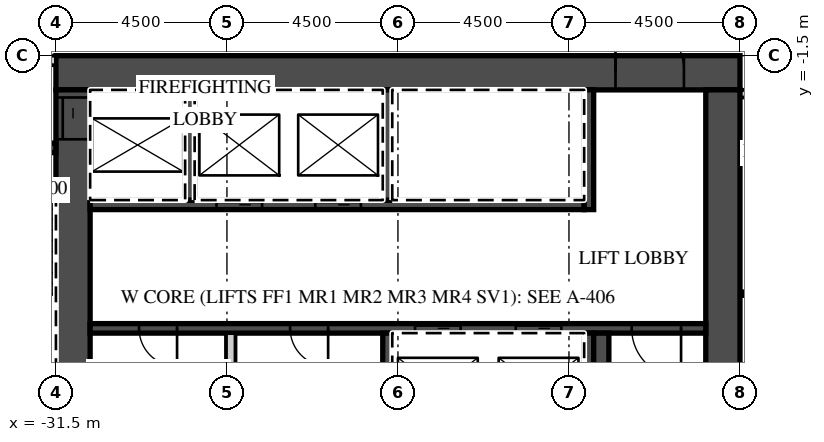
"""IFC4 building model, lengths in metres.
Left out: names, types, materials, properties, quantities, classifications, styles, units other than length and angle.
Written with IfcOpenShell. Run it as: python <this file> out.ifc"""

import sys

from ifc_helpers import new_model, si_unit, direction, frame, frame_2d, origin, place, context, subcontext, project, spatial, rectangle, extrude, element, fill, save


model = new_model("IFC4")
c1 = context("Model", 3, precision=1e-05, world=origin(), true_north=direction((0.0, 1.0)))
c2 = subcontext(c1, "Body", "Model", "MODEL_VIEW")
j1 = project(units=[si_unit("LENGTHUNIT", "METRE"), si_unit("PLANEANGLEUNIT", "RADIAN")], contexts=[c1])
p1 = place(None, origin())
s1 = spatial("IfcSite", under=j1, at=p1, CompositionType="ELEMENT")
p2 = place(p1, origin())
s2 = spatial("IfcBuilding", under=s1, at=p2, CompositionType="ELEMENT")
p3 = place(p2, frame((0.0, 0.0, 176.8)))
s3 = spatial("IfcBuildingStorey", under=s2, at=p3, CompositionType="ELEMENT", Elevation=176.8)
p4 = place(p3, frame((-13.5, -2.5, 0.0), z_axis=(0.0, 0.0, 1.0), x_axis=(1.0, 0.0, 0.0)))
e1 = element("IfcWall", 1, at=p4, inside=s3, PredefinedType="PARTITIONING", context=c2, shape_type="SweptSolid", body=[
    extrude(rectangle(XDim=27.0, YDim=0.2, at=frame_2d((13.5, 0.0))), origin(), (0.0, 0.0, 1.0), 3.02),
])
p5 = place(p4, frame((2.925, 0.0, 0.0)))
e2 = element("IfcOpeningElement", 2, at=p5, cuts=e1, PredefinedType="OPENING", context=c2, shape_type="SweptSolid", body=[
    extrude(rectangle(XDim=1.0, YDim=2.1, at=frame_2d((0.5, 1.05))), frame((0.0, 0.11, 0.0), z_axis=(0.0, -1.0, 0.0), x_axis=(1.0, 0.0, 0.0)), (0.0, 0.0, 1.0), 0.22),
])
p6 = place(p4, frame((7.45, 0.0, 0.0)))
e3 = element("IfcOpeningElement", 3, at=p6, cuts=e1, PredefinedType="OPENING", context=c2, shape_type="SweptSolid", body=[
    extrude(rectangle(XDim=1.0, YDim=2.1, at=frame_2d((0.5, 1.05))), frame((0.0, 0.11, 0.0), z_axis=(0.0, -1.0, 0.0), x_axis=(1.0, 0.0, 0.0)), (0.0, 0.0, 1.0), 0.22),
])
p7 = place(p4, frame((11.925, 0.0, 0.0)))
e4 = element("IfcOpeningElement", 4, at=p7, cuts=e1, PredefinedType="OPENING", context=c2, shape_type="SweptSolid", body=[
    extrude(rectangle(XDim=1.0, YDim=2.1, at=frame_2d((0.5, 1.05))), frame((0.0, 0.11, 0.0), z_axis=(0.0, -1.0, 0.0), x_axis=(1.0, 0.0, 0.0)), (0.0, 0.0, 1.0), 0.22),
])
p8 = place(p4, frame((18.862, 0.0, 0.0)))
e5 = element("IfcOpeningElement", 5, at=p8, cuts=e1, PredefinedType="OPENING", context=c2, shape_type="SweptSolid", body=[
    extrude(rectangle(XDim=1.2, YDim=2.1, at=frame_2d((0.6, 1.05))), frame((0.0, 0.11, 0.0), z_axis=(0.0, -1.0, 0.0), x_axis=(1.0, 0.0, 0.0)), (0.0, 0.0, 1.0), 0.22),
])
p9 = place(p4, frame((25.425, 0.0, 0.0)))
e6 = element("IfcOpeningElement", 6, at=p9, cuts=e1, PredefinedType="OPENING", context=c2, shape_type="SweptSolid", body=[
    extrude(rectangle(XDim=1.0, YDim=2.1, at=frame_2d((0.5, 1.05))), frame((0.0, 0.11, 0.0), z_axis=(0.0, -1.0, 0.0), x_axis=(1.0, 0.0, 0.0)), (0.0, 0.0, 1.0), 0.22),
])
p10 = place(p3, frame((-31.5, -1.95, 0.0), z_axis=(0.0, 0.0, 1.0), x_axis=(1.0, 0.0, 0.0)))
e7 = element("IfcWall", 7, at=p10, inside=s3, PredefinedType="SHEAR", context=c2, shape_type="SweptSolid", body=[
    extrude(rectangle(XDim=18.0, YDim=0.9, at=frame_2d((9.0, 0.0))), origin(), (0.0, 0.0, 1.0), 3.02),
])
p11 = place(p10, frame((14.725, 0.0, 0.0)))
e8 = element("IfcOpeningElement", 8, at=p11, cuts=e7, PredefinedType="OPENING", context=c2, shape_type="SweptSolid", body=[
    extrude(rectangle(XDim=1.8, YDim=2.1, at=frame_2d((0.9, 1.05))), frame((0.0, 0.46, 0.0), z_axis=(0.0, -1.0, 0.0), x_axis=(1.0, 0.0, 0.0)), (0.0, 0.0, 1.0), 0.92),
])
p12 = place(p3, frame((-31.05, -15.2, 0.0), z_axis=(0.0, 0.0, 1.0), x_axis=(0.0, 1.0, 0.0)))
e9 = element("IfcWall", 9, at=p12, inside=s3, PredefinedType="SHEAR", context=c2, shape_type="SweptSolid", body=[
    extrude(rectangle(XDim=12.8, YDim=0.9, at=frame_2d((6.4, 0.0))), origin(), (0.0, 0.0, 1.0), 3.02),
])
p13 = place(p12, frame((11.5, 0.0, 0.0)))
e10 = element("IfcOpeningElement", 10, at=p13, cuts=e9, PredefinedType="OPENING", context=c2, shape_type="SweptSolid", body=[
    extrude(rectangle(XDim=1.1, YDim=2.1, at=frame_2d((0.55, 1.05))), frame((0.0, 0.46, 0.0), z_axis=(0.0, -1.0, 0.0), x_axis=(1.0, 0.0, 0.0)), (0.0, 0.0, 1.0), 0.92),
])
p14 = place(p3, frame((-13.95, -14.6, 0.0), z_axis=(0.0, 0.0, 1.0), x_axis=(0.0, 1.0, 0.0)))
e11 = element("IfcWall", 11, at=p14, inside=s3, PredefinedType="SHEAR", context=c2, shape_type="SweptSolid", body=[
    extrude(rectangle(XDim=12.2, YDim=0.9, at=frame_2d((6.1, 0.0))), origin(), (0.0, 0.0, 1.0), 3.02),
])
p15 = place(p3, frame((-30.6, -5.425, 0.0), z_axis=(0.0, 0.0, 1.0), x_axis=(1.0, 0.0, 0.0)))
e12 = element("IfcWall", 12, at=p15, inside=s3, PredefinedType="SHEAR", context=c2, shape_type="SweptSolid", body=[
    extrude(rectangle(XDim=13.0, YDim=0.25, at=frame_2d((6.5, 0.0))), origin(), (0.0, 0.0, 1.0), 3.02),
])
p16 = place(p15, frame((3.325, 0.0, 0.0)))
e13 = element("IfcOpeningElement", 13, at=p16, cuts=e12, PredefinedType="OPENING", context=c2, shape_type="SweptSolid", body=[
    extrude(rectangle(XDim=1.2, YDim=2.1, at=frame_2d((0.6, 1.05))), frame((0.0, 0.135, 0.0), z_axis=(0.0, -1.0, 0.0), x_axis=(1.0, 0.0, 0.0)), (0.0, 0.0, 1.0), 0.27),
])
p17 = place(p15, frame((5.925, 0.0, 0.0)))
e14 = element("IfcOpeningElement", 14, at=p17, cuts=e12, PredefinedType="OPENING", context=c2, shape_type="SweptSolid", body=[
    extrude(rectangle(XDim=1.2, YDim=2.1, at=frame_2d((0.6, 1.05))), frame((0.0, 0.135, 0.0), z_axis=(0.0, -1.0, 0.0), x_axis=(1.0, 0.0, 0.0)), (0.0, 0.0, 1.0), 0.27),
])
p18 = place(p3, frame((-17.475, -5.55, 0.0), z_axis=(0.0, 0.0, 1.0), x_axis=(0.0, 1.0, 0.0)))
e15 = element("IfcWall", 15, at=p18, inside=s3, PredefinedType="SHEAR", context=c2, shape_type="SweptSolid", body=[
    extrude(rectangle(XDim=3.15, YDim=0.25, at=frame_2d((1.575, 0.0))), origin(), (0.0, 0.0, 1.0), 3.02),
])
for number, where, z_axis, x_axis in (
    (16, (-27.975, -5.3, 0.0), (0.0, 0.0, 1.0), (0.0, 1.0, 0.0)),
    (17, (-22.775, -5.3, 0.0), (0.0, 0.0, 1.0), (0.0, 1.0, 0.0)),
):
    element("IfcWall", number, at=place(p3, frame(where, z_axis=z_axis, x_axis=x_axis)), inside=s3, PredefinedType="SHEAR", context=c2, shape_type="SweptSolid", body=[
        extrude(rectangle(XDim=2.9, YDim=0.25, at=frame_2d((1.45, 0.0))), origin(), (0.0, 0.0, 1.0), 3.02),
    ])
p19 = place(p3, frame((-30.6, -8.675, 0.0), z_axis=(0.0, 0.0, 1.0), x_axis=(1.0, 0.0, 0.0)))
e18 = element("IfcWall", 18, at=p19, inside=s3, PredefinedType="SHEAR", context=c2, shape_type="SweptSolid", body=[
    extrude(rectangle(XDim=16.2, YDim=0.25, at=frame_2d((8.1, 0.0))), origin(), (0.0, 0.0, 1.0), 3.02),
])
p20 = place(p19, frame((8.55, 0.0, 0.0)))
e19 = element("IfcOpeningElement", 19, at=p20, cuts=e18, PredefinedType="OPENING", context=c2, shape_type="SweptSolid", body=[
    extrude(rectangle(XDim=1.2, YDim=2.1, at=frame_2d((0.6, 1.05))), frame((0.0, 0.135, 0.0), z_axis=(0.0, -1.0, 0.0), x_axis=(1.0, 0.0, 0.0)), (0.0, 0.0, 1.0), 0.27),
])
p21 = place(p19, frame((11.2, 0.0, 0.0)))
e20 = element("IfcOpeningElement", 20, at=p21, cuts=e18, PredefinedType="OPENING", context=c2, shape_type="SweptSolid", body=[
    extrude(rectangle(XDim=1.2, YDim=2.1, at=frame_2d((0.6, 1.05))), frame((0.0, 0.135, 0.0), z_axis=(0.0, -1.0, 0.0), x_axis=(1.0, 0.0, 0.0)), (0.0, 0.0, 1.0), 0.27),
])
p22 = place(p19, frame((14.25, 0.0, 0.0)))
e21 = element("IfcOpeningElement", 21, at=p22, cuts=e18, PredefinedType="OPENING", context=c2, shape_type="SweptSolid", body=[
    extrude(rectangle(XDim=1.3, YDim=2.1, at=frame_2d((0.65, 1.05))), frame((0.0, 0.135, 0.0), z_axis=(0.0, -1.0, 0.0), x_axis=(1.0, 0.0, 0.0)), (0.0, 0.0, 1.0), 0.27),
])
p23 = place(p19, frame((1.288, 0.0, 0.0)))
e22 = element("IfcOpeningElement", 22, at=p23, cuts=e18, PredefinedType="OPENING", context=c2, shape_type="SweptSolid", body=[
    extrude(rectangle(XDim=1.0, YDim=2.1, at=frame_2d((0.5, 1.05))), frame((0.0, 0.135, 0.0), z_axis=(0.0, -1.0, 0.0), x_axis=(1.0, 0.0, 0.0)), (0.0, 0.0, 1.0), 0.27),
])
p24 = place(p19, frame((5.262, 0.0, 0.0)))
e23 = element("IfcOpeningElement", 23, at=p24, cuts=e18, PredefinedType="OPENING", context=c2, shape_type="SweptSolid", body=[
    extrude(rectangle(XDim=1.0, YDim=2.1, at=frame_2d((0.5, 1.05))), frame((0.0, 0.135, 0.0), z_axis=(0.0, -1.0, 0.0), x_axis=(1.0, 0.0, 0.0)), (0.0, 0.0, 1.0), 0.27),
])
for number, where, z_axis, x_axis in (
    (24, (-17.475, -11.7, 0.0), (0.0, 0.0, 1.0), (0.0, 1.0, 0.0)),
    (25, (-22.775, -11.7, 0.0), (0.0, 0.0, 1.0), (0.0, 1.0, 0.0)),
):
    element("IfcWall", number, at=place(p3, frame(where, z_axis=z_axis, x_axis=x_axis)), inside=s3, PredefinedType="SHEAR", context=c2, shape_type="SweptSolid", body=[
        extrude(rectangle(XDim=2.9, YDim=0.25, at=frame_2d((1.45, 0.0))), origin(), (0.0, 0.0, 1.0), 3.02),
    ])
p25 = place(p3, frame((-26.9, -11.7, 0.0), z_axis=(0.0, 0.0, 1.0), x_axis=(0.0, 1.0, 0.0)))
e26 = element("IfcWall", 26, at=p25, inside=s3, PredefinedType="PARTITIONING", context=c2, shape_type="SweptSolid", body=[
    extrude(rectangle(XDim=2.9, YDim=0.25, at=frame_2d((1.45, 0.0))), origin(), (0.0, 0.0, 1.0), 3.02),
])
p26 = place(p3, frame((-17.15, -14.6, 0.0), z_axis=(0.0, 0.0, 1.0), x_axis=(0.0, 1.0, 0.0)))
e27 = element("IfcWall", 27, at=p26, inside=s3, PredefinedType="SHEAR", context=c2, shape_type="SweptSolid", body=[
    extrude(rectangle(XDim=5.8, YDim=0.4, at=frame_2d((2.9, 0.0))), origin(), (0.0, 0.0, 1.0), 3.02),
])
p27 = place(p3, frame((-42.632, -1.625, 0.0), z_axis=(0.0, 0.0, 1.0), x_axis=(1.0, 0.0, 0.0)))
e28 = element("IfcWall", 28, at=p27, inside=s3, PredefinedType="PARTITIONING", context=c2, shape_type="SweptSolid", body=[
    extrude(rectangle(XDim=11.132, YDim=0.25, at=frame_2d((5.566, 0.0))), origin(), (0.0, 0.0, 1.0), 3.02),
])
p28 = place(p27, frame((9.207, 0.0, 0.0)))
e29 = element("IfcOpeningElement", 29, at=p28, cuts=e28, PredefinedType="OPENING", context=c2, shape_type="SweptSolid", body=[
    extrude(rectangle(XDim=1.3, YDim=2.1, at=frame_2d((0.65, 1.05))), frame((0.0, 0.135, 0.0), z_axis=(0.0, -1.0, 0.0), x_axis=(1.0, 0.0, 0.0)), (0.0, 0.0, 1.0), 0.27),
])
p29 = place(p27, frame((6.781, 0.0, 0.0)))
e30 = element("IfcOpeningElement", 30, at=p29, cuts=e28, PredefinedType="OPENING", context=c2, shape_type="SweptSolid", body=[
    extrude(rectangle(XDim=1.1, YDim=2.1, at=frame_2d((0.55, 1.05))), frame((0.0, 0.135, 0.0), z_axis=(0.0, -1.0, 0.0), x_axis=(1.0, 0.0, 0.0)), (0.0, 0.0, 1.0), 0.27),
])
p30 = place(p3, frame((-34.05, -3.925, 0.0), z_axis=(0.0, 0.0, 1.0), x_axis=(1.0, 0.0, 0.0)))
e31 = element("IfcWall", 31, at=p30, inside=s3, PredefinedType="SHEAR", context=c2, shape_type="SweptSolid", body=[
    extrude(rectangle(XDim=2.55, YDim=0.25, at=frame_2d((1.275, 0.0))), origin(), (0.0, 0.0, 1.0), 3.02),
])
p31 = place(p30, frame((0.625, 0.0, 0.0)))
e32 = element("IfcOpeningElement", 32, at=p31, cuts=e31, PredefinedType="OPENING", context=c2, shape_type="SweptSolid", body=[
    extrude(rectangle(XDim=1.3, YDim=2.1, at=frame_2d((0.65, 1.05))), frame((0.0, 0.135, 0.0), z_axis=(0.0, -1.0, 0.0), x_axis=(1.0, 0.0, 0.0)), (0.0, 0.0, 1.0), 0.27),
])
p32 = place(p20, origin())
e33 = element("IfcDoor", 33, at=p32, inside=s3, OperationType="SLIDING_TO_LEFT", PredefinedType="DOOR", context=c2, shape_type="SweptSolid", body=[
    extrude(rectangle(XDim=1.2, YDim=2.1, at=frame_2d((0.6, 1.05))), frame((0.0, 0.025, 0.0), z_axis=(0.0, -1.0, 0.0), x_axis=(1.0, 0.0, 0.0)), (0.0, 0.0, 1.0), 0.05),
])
fill(e19, e33)
p33 = place(p21, origin())
e34 = element("IfcDoor", 34, at=p33, inside=s3, OperationType="SLIDING_TO_RIGHT", PredefinedType="DOOR", context=c2, shape_type="SweptSolid", body=[
    extrude(rectangle(XDim=1.2, YDim=2.1, at=frame_2d((0.6, 1.05))), frame((0.0, 0.025, 0.0), z_axis=(0.0, -1.0, 0.0), x_axis=(1.0, 0.0, 0.0)), (0.0, 0.0, 1.0), 0.05),
])
fill(e20, e34)
p34 = place(p16, origin())
e35 = element("IfcDoor", 35, at=p34, inside=s3, OperationType="SLIDING_TO_RIGHT", PredefinedType="DOOR", context=c2, shape_type="SweptSolid", body=[
    extrude(rectangle(XDim=1.2, YDim=2.1, at=frame_2d((0.6, 1.05))), frame((0.0, 0.025, 0.0), z_axis=(0.0, -1.0, 0.0), x_axis=(1.0, 0.0, 0.0)), (0.0, 0.0, 1.0), 0.05),
])
fill(e13, e35)
p35 = place(p17, origin())
e36 = element("IfcDoor", 36, at=p35, inside=s3, OperationType="SLIDING_TO_RIGHT", PredefinedType="DOOR", context=c2, shape_type="SweptSolid", body=[
    extrude(rectangle(XDim=1.2, YDim=2.1, at=frame_2d((0.6, 1.05))), frame((0.0, 0.025, 0.0), z_axis=(0.0, -1.0, 0.0), x_axis=(1.0, 0.0, 0.0)), (0.0, 0.0, 1.0), 0.05),
])
fill(e14, e36)
p36 = place(p13, origin())
e37 = element("IfcDoor", 37, at=p36, inside=s3, OperationType="SLIDING_TO_RIGHT", PredefinedType="DOOR", context=c2, shape_type="SweptSolid", body=[
    extrude(rectangle(XDim=1.1, YDim=2.1, at=frame_2d((0.55, 1.05))), frame((0.0, 0.025, 0.0), z_axis=(0.0, -1.0, 0.0), x_axis=(1.0, 0.0, 0.0)), (0.0, 0.0, 1.0), 0.05),
])
fill(e10, e37)
p37 = place(p11, origin())
e38 = element("IfcDoor", 38, at=p37, inside=s3, OperationType="DOUBLE_DOOR_DOUBLE_SWING", PredefinedType="DOOR", context=c2, shape_type="SweptSolid", body=[
    extrude(rectangle(XDim=1.8, YDim=2.1, at=frame_2d((0.9, 1.05))), frame((0.0, 0.025, 0.0), z_axis=(0.0, -1.0, 0.0), x_axis=(1.0, 0.0, 0.0)), (0.0, 0.0, 1.0), 0.05),
])
fill(e8, e38)
p38 = place(p22, origin())
e39 = element("IfcDoor", 39, at=p38, inside=s3, OperationType="SINGLE_SWING_RIGHT", PredefinedType="DOOR", context=c2, shape_type="SweptSolid", body=[
    extrude(rectangle(XDim=1.3, YDim=2.1, at=frame_2d((0.65, 1.05))), frame((0.0, 0.025, 0.0), z_axis=(0.0, -1.0, 0.0), x_axis=(1.0, 0.0, 0.0)), (0.0, 0.0, 1.0), 0.05),
])
fill(e21, e39)
p39 = place(p23, origin())
e40 = element("IfcDoor", 40, at=p39, inside=s3, OperationType="SINGLE_SWING_RIGHT", PredefinedType="DOOR", context=c2, shape_type="SweptSolid", body=[
    extrude(rectangle(XDim=1.0, YDim=2.1, at=frame_2d((0.5, 1.05))), frame((0.0, 0.025, 0.0), z_axis=(0.0, -1.0, 0.0), x_axis=(1.0, 0.0, 0.0)), (0.0, 0.0, 1.0), 0.05),
])
fill(e22, e40)
p40 = place(p24, origin())
e41 = element("IfcDoor", 41, at=p40, inside=s3, OperationType="SINGLE_SWING_RIGHT", PredefinedType="DOOR", context=c2, shape_type="SweptSolid", body=[
    extrude(rectangle(XDim=1.0, YDim=2.1, at=frame_2d((0.5, 1.05))), frame((0.0, 0.025, 0.0), z_axis=(0.0, -1.0, 0.0), x_axis=(1.0, 0.0, 0.0)), (0.0, 0.0, 1.0), 0.05),
])
fill(e23, e41)
save(model, sys.argv[1])
